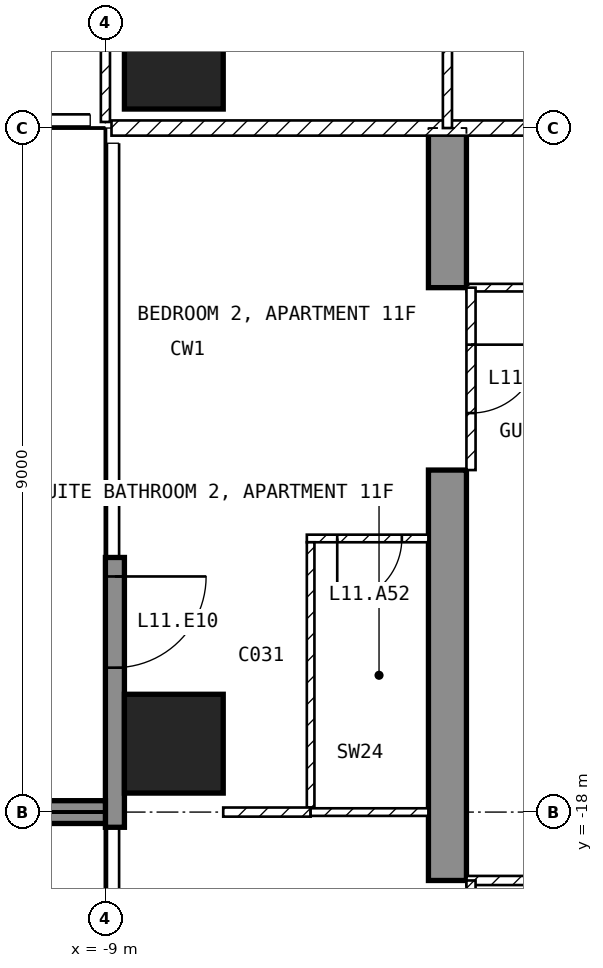
"""IFC4 building model, lengths in metres.
Left out: names, types, materials, properties, quantities, classifications, styles, units other than length and angle.
Written with IfcOpenShell. Run it as: python <this file> out.ifc"""

import sys

from ifc_helpers import new_model, si_unit, direction, frame, frame_2d, origin, origin_2d, place, context, subcontext, project, spatial, polyline, rectangle, outline, extrude, element, fill, save


model = new_model("IFC4")
c1 = context("Model", 3, precision=1e-05, world=origin(), true_north=direction((0.0, 1.0)))
c2 = subcontext(c1, "Body", "Model", "MODEL_VIEW")
j1 = project(units=[si_unit("LENGTHUNIT", "METRE"), si_unit("PLANEANGLEUNIT", "RADIAN")], contexts=[c1])
p1 = place(None, origin())
s1 = spatial("IfcSite", under=j1, at=p1, CompositionType="ELEMENT")
p2 = place(p1, origin())
s2 = spatial("IfcBuilding", under=s1, at=p2, CompositionType="ELEMENT")
p3 = place(p2, frame((0.0, 0.0, 57.5)))
s3 = spatial("IfcBuildingStorey", under=s2, at=p3, CompositionType="ELEMENT", Elevation=57.5)
for number, where, z_axis, x_axis in (
    (1, (-8.1, -17.1, -0.25), (0.0, 0.0, 1.0), (1.0, 0.0, 0.0)),
    (2, (-8.1, -8.1, -0.25), (0.0, 0.0, 1.0), (1.0, 0.0, 0.0)),
):
    element("IfcColumn", number, at=place(p3, frame(where, z_axis=z_axis, x_axis=x_axis)), inside=s3, PredefinedType="COLUMN", context=c2, shape_type="SweptSolid", body=[
        extrude(rectangle(XDim=1.3, YDim=1.3, at=origin_2d()), origin(), (0.0, 0.0, 1.0), 3.5),
    ])
p4 = place(p3, frame((-4.75, -25.45, -0.25), z_axis=(1.0, 0.0, 0.0), x_axis=(0.0, 1.0, 0.0)))
e3 = element("IfcWall", 3, at=p4, inside=s3, PredefinedType="SHEAR", context=c2, shape_type="SweptSolid", body=[
    extrude(outline(polyline([(0.0, 0.0), (4.15, 0.0), (4.15, 2.65), (6.55, 2.65), (6.55, 0.0), (11.95, 0.0), (11.95, 2.65), (14.35, 2.65), (14.35, 0.0), (16.45, 0.0), (16.45, 3.5), (0.0, 3.5), (0.0, 0.0)])), origin(), (0.0, 0.0, 1.0), 0.5),
])
p5 = place(p3, frame((-8.875, -14.65, 0.0), z_axis=(0.0, 0.0, 1.0), x_axis=(0.0, -1.0, 0.0)))
e4 = element("IfcWall", 4, at=p5, inside=s3, PredefinedType="SOLIDWALL", context=c2, shape_type="SweptSolid", body=[
    extrude(rectangle(XDim=3.55, YDim=0.25, at=frame_2d((1.775, 0.0))), origin(), (0.0, 0.0, 1.0), 3.25),
])
p6 = place(p5, frame((0.25, 0.0, 0.0)))
e5 = element("IfcOpeningElement", 5, at=p6, cuts=e4, PredefinedType="OPENING", context=c2, shape_type="SweptSolid", body=[
    extrude(rectangle(XDim=1.2, YDim=2.4, at=frame_2d((0.6, 1.2))), frame((0.0, 0.135, 0.0), z_axis=(0.0, -1.0, 0.0), x_axis=(1.0, 0.0, 0.0)), (0.0, 0.0, 1.0), 0.27),
])
p7 = place(p3, frame((-9.0, -18.0, 0.0), z_axis=(0.0, 0.0, 1.0), x_axis=(-1.0, 0.0, 0.0)))
e6 = element("IfcWall", 6, at=p7, inside=s3, PredefinedType="SOLIDWALL", context=c2, shape_type="SweptSolid", body=[
    extrude(rectangle(XDim=2.7, YDim=0.3, at=frame_2d((1.35, 0.0))), origin(), (0.0, 0.0, 1.0), 3.25),
])
p8 = place(p3, frame((8.92, -9.0, 0.0), z_axis=(0.0, 0.0, 1.0), x_axis=(-1.0, 0.0, 0.0)))
e7 = element("IfcWall", 7, at=p8, inside=s3, PredefinedType="PARTITIONING", context=c2, shape_type="SweptSolid", body=[
    extrude(rectangle(XDim=17.84, YDim=0.2, at=frame_2d((8.92, 0.0))), origin(), (0.0, 0.0, 1.0), 3.25),
])
p9 = place(p8, frame((8.42, 0.0, 0.0)))
e8 = element("IfcOpeningElement", 8, at=p9, cuts=e7, PredefinedType="OPENING", context=c2, shape_type="SweptSolid", body=[
    extrude(rectangle(XDim=1.0, YDim=2.1, at=frame_2d((0.5, 1.05))), frame((0.0, 0.11, 0.0), z_axis=(0.0, -1.0, 0.0), x_axis=(1.0, 0.0, 0.0)), (0.0, 0.0, 1.0), 0.22),
])
p10 = place(p3, frame((-9.0, -3.6, 0.0), z_axis=(0.0, 0.0, 1.0), x_axis=(0.0, -1.0, 0.0)))
e9 = element("IfcWall", 9, at=p10, inside=s3, PredefinedType="PARTITIONING", context=c2, shape_type="SweptSolid", body=[
    extrude(rectangle(XDim=5.32, YDim=0.12, at=frame_2d((2.66, 0.0))), origin(), (0.0, 0.0, 1.0), 3.25),
])
p11 = place(p10, frame((1.738, 0.0, 0.0)))
e10 = element("IfcOpeningElement", 10, at=p11, cuts=e9, PredefinedType="OPENING", context=c2, shape_type="SweptSolid", body=[
    extrude(rectangle(XDim=0.9, YDim=2.1, at=frame_2d((0.45, 1.05))), frame((0.0, 0.07, 0.0), z_axis=(0.0, -1.0, 0.0), x_axis=(1.0, 0.0, 0.0)), (0.0, 0.0, 1.0), 0.14),
])
p12 = place(p3, frame((-4.5, -1.3, 0.0), z_axis=(0.0, 0.0, 1.0), x_axis=(0.0, -1.0, 0.0)))
e11 = element("IfcWall", 11, at=p12, inside=s3, PredefinedType="PARTITIONING", context=c2, shape_type="SweptSolid", body=[
    extrude(rectangle(XDim=7.7, YDim=0.12, at=frame_2d((3.85, 0.0))), origin(), (0.0, 0.0, 1.0), 3.25),
])
p13 = place(p12, frame((4.988, 0.0, 0.0)))
e12 = element("IfcOpeningElement", 12, at=p13, cuts=e11, PredefinedType="OPENING", context=c2, shape_type="SweptSolid", body=[
    extrude(rectangle(XDim=0.9, YDim=2.1, at=frame_2d((0.45, 1.05))), frame((0.0, 0.07, 0.0), z_axis=(0.0, -1.0, 0.0), x_axis=(1.0, 0.0, 0.0)), (0.0, 0.0, 1.0), 0.14),
])
p14 = place(p3, frame((-2.1, -11.1, 0.0), z_axis=(0.0, 0.0, 1.0), x_axis=(-1.0, 0.0, 0.0)))
e13 = element("IfcWall", 13, at=p14, inside=s3, PredefinedType="PARTITIONING", context=c2, shape_type="SweptSolid", body=[
    extrude(rectangle(XDim=2.15, YDim=0.1, at=frame_2d((1.075, 0.0))), origin(), (0.0, 0.0, 1.0), 3.25),
])
p15 = place(p3, frame((4.25, -18.9, 0.0), z_axis=(0.0, 0.0, 1.0), x_axis=(-1.0, 0.0, 0.0)))
e14 = element("IfcWall", 14, at=p15, inside=s3, PredefinedType="PARTITIONING", context=c2, shape_type="SweptSolid", body=[
    extrude(rectangle(XDim=8.5, YDim=0.12, at=frame_2d((4.25, 0.0))), origin(), (0.0, 0.0, 1.0), 3.25),
])
p16 = place(p15, frame((1.925, 0.0, 0.0)))
e15 = element("IfcOpeningElement", 15, at=p16, cuts=e14, PredefinedType="OPENING", context=c2, shape_type="SweptSolid", body=[
    extrude(rectangle(XDim=0.9, YDim=2.1, at=frame_2d((0.45, 1.05))), frame((0.0, 0.07, 0.0), z_axis=(0.0, -1.0, 0.0), x_axis=(1.0, 0.0, 0.0)), (0.0, 0.0, 1.0), 0.14),
])
p17 = place(p3, frame((-4.75, -14.4, 0.0), z_axis=(0.0, 0.0, 1.0), x_axis=(-1.0, 0.0, 0.0)))
e16 = element("IfcWall", 16, at=p17, inside=s3, PredefinedType="PARTITIONING", context=c2, shape_type="SweptSolid", body=[
    extrude(rectangle(XDim=1.6, YDim=0.1, at=frame_2d((0.8, 0.0))), origin(), (0.0, 0.0, 1.0), 3.25),
])
p18 = place(p17, frame((0.35, 0.0, 0.0)))
e17 = element("IfcOpeningElement", 17, at=p18, cuts=e16, PredefinedType="OPENING", context=c2, shape_type="SweptSolid", body=[
    extrude(rectangle(XDim=0.85, YDim=2.1, at=frame_2d((0.425, 1.05))), frame((0.0, 0.06, 0.0), z_axis=(0.0, -1.0, 0.0), x_axis=(1.0, 0.0, 0.0)), (0.0, 0.0, 1.0), 0.12),
])
p19 = place(p3, frame((-6.3, -14.45, 0.0), z_axis=(0.0, 0.0, 1.0), x_axis=(0.0, -1.0, 0.0)))
e18 = element("IfcWall", 18, at=p19, inside=s3, PredefinedType="PARTITIONING", context=c2, shape_type="SweptSolid", body=[
    extrude(rectangle(XDim=3.49, YDim=0.1, at=frame_2d((1.745, 0.0))), origin(), (0.0, 0.0, 1.0), 3.25),
])
p20 = place(p3, frame((-6.3, -18.0, 0.0), z_axis=(0.0, 0.0, 1.0), x_axis=(-1.0, 0.0, 0.0)))
e19 = element("IfcWall", 19, at=p20, inside=s3, PredefinedType="PARTITIONING", context=c2, shape_type="SweptSolid", body=[
    extrude(rectangle(XDim=1.15, YDim=0.12, at=frame_2d((0.575, 0.0))), origin(), (0.0, 0.0, 1.0), 3.25),
])
p21 = place(p3, frame((-4.75, -18.0, 0.0), z_axis=(0.0, 0.0, 1.0), x_axis=(-1.0, 0.0, 0.0)))
e20 = element("IfcWall", 20, at=p21, inside=s3, PredefinedType="PARTITIONING", context=c2, shape_type="SweptSolid", body=[
    extrude(rectangle(XDim=1.55, YDim=0.1, at=frame_2d((0.775, 0.0))), origin(), (0.0, 0.0, 1.0), 3.25),
])
p22 = place(p3, frame((-4.19, -11.1, 0.0), z_axis=(0.0, 0.0, 1.0), x_axis=(0.0, -1.0, 0.0)))
e21 = element("IfcWall", 21, at=p22, inside=s3, PredefinedType="PARTITIONING", context=c2, shape_type="SweptSolid", body=[
    extrude(rectangle(XDim=2.4, YDim=0.12, at=frame_2d((1.2, 0.0))), origin(), (0.0, 0.0, 1.0), 2.4),
])
p23 = place(p22, frame((0.75, 0.0, 0.0)))
e22 = element("IfcOpeningElement", 22, at=p23, cuts=e21, PredefinedType="OPENING", context=c2, shape_type="SweptSolid", body=[
    extrude(rectangle(XDim=0.9, YDim=2.1, at=frame_2d((0.45, 1.05))), frame((0.0, 0.07, 0.0), z_axis=(0.0, -1.0, 0.0), x_axis=(1.0, 0.0, 0.0)), (0.0, 0.0, 1.0), 0.14),
])
p24 = place(p3, frame((-4.19, -18.9, 0.0), z_axis=(0.0, 0.0, 1.0), x_axis=(0.0, -1.0, 0.0)))
e23 = element("IfcWall", 23, at=p24, inside=s3, PredefinedType="PARTITIONING", context=c2, shape_type="SweptSolid", body=[
    extrude(rectangle(XDim=2.4, YDim=0.12, at=frame_2d((1.2, 0.0))), origin(), (0.0, 0.0, 1.0), 2.4),
])
p25 = place(p24, frame((0.75, 0.0, 0.0)))
e24 = element("IfcOpeningElement", 24, at=p25, cuts=e23, PredefinedType="OPENING", context=c2, shape_type="SweptSolid", body=[
    extrude(rectangle(XDim=0.9, YDim=2.1, at=frame_2d((0.45, 1.05))), frame((0.0, 0.07, 0.0), z_axis=(0.0, -1.0, 0.0), x_axis=(1.0, 0.0, 0.0)), (0.0, 0.0, 1.0), 0.14),
])
p26 = place(p6, origin())
e25 = element("IfcDoor", 25, at=p26, inside=s3, OperationType="SINGLE_SWING_LEFT", PredefinedType="DOOR", context=c2, shape_type="SweptSolid", body=[
    extrude(rectangle(XDim=1.2, YDim=2.4, at=frame_2d((0.6, 1.2))), frame((0.0, 0.025, 0.0), z_axis=(0.0, -1.0, 0.0), x_axis=(1.0, 0.0, 0.0)), (0.0, 0.0, 1.0), 0.05),
])
fill(e5, e25)
p27 = place(p18, origin())
e26 = element("IfcDoor", 26, at=p27, inside=s3, OperationType="SINGLE_SWING_RIGHT", PredefinedType="DOOR", context=c2, shape_type="SweptSolid", body=[
    extrude(rectangle(XDim=0.85, YDim=2.1, at=frame_2d((0.425, 1.05))), frame((0.0, 0.025, 0.0), z_axis=(0.0, -1.0, 0.0), x_axis=(1.0, 0.0, 0.0)), (0.0, 0.0, 1.0), 0.05),
])
fill(e17, e26)
p28 = place(p23, origin())
e27 = element("IfcDoor", 27, at=p28, inside=s3, OperationType="SINGLE_SWING_LEFT", PredefinedType="DOOR", context=c2, shape_type="SweptSolid", body=[
    extrude(rectangle(XDim=0.9, YDim=2.1, at=frame_2d((0.45, 1.05))), frame((0.0, 0.025, 0.0), z_axis=(0.0, -1.0, 0.0), x_axis=(1.0, 0.0, 0.0)), (0.0, 0.0, 1.0), 0.05),
])
fill(e22, e27)
save(model, sys.argv[1])
